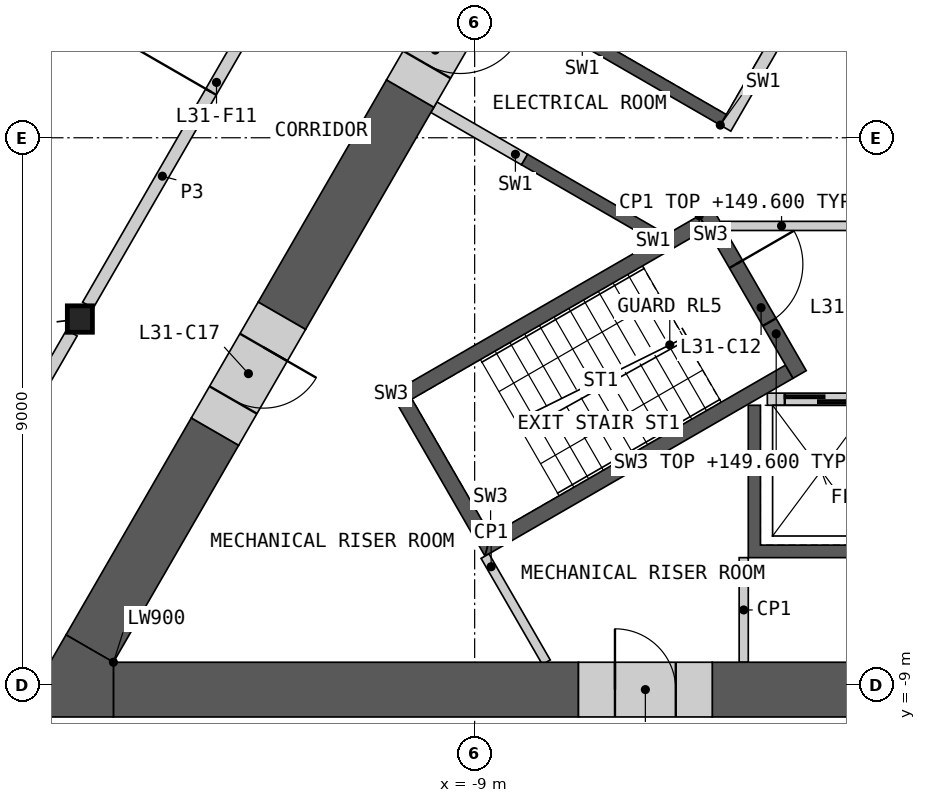
"""IFC4 building model, lengths in metres.
Left out: names, types, materials, properties, quantities, classifications, styles, units other than length and angle.
Written with IfcOpenShell. Run it as: python <this file> out.ifc"""

import sys

from ifc_helpers import new_model, si_unit, direction, frame, frame_2d, origin, origin_2d, place, context, subcontext, project, spatial, polyline, rectangle, i_section, outline, extrude, element, fill, save


model = new_model("IFC4")
c1 = context("Model", 3, precision=1e-05, world=origin(), true_north=direction((0.0, 1.0)))
c2 = subcontext(c1, "Body", "Model", "MODEL_VIEW")
j1 = project(units=[si_unit("LENGTHUNIT", "METRE"), si_unit("PLANEANGLEUNIT", "RADIAN")], contexts=[c1])
p1 = place(None, origin())
s1 = spatial("IfcSite", under=j1, at=p1, CompositionType="ELEMENT")
p2 = place(p1, origin())
s2 = spatial("IfcBuilding", under=s1, at=p2, CompositionType="ELEMENT")
p3 = place(p2, frame((0.0, 0.0, 145.8)))
s3 = spatial("IfcBuildingStorey", under=s2, at=p3, CompositionType="ELEMENT", Elevation=145.8)
p4 = place(p3, frame((-15.493, -2.982, 0.0), z_axis=(0.0, 0.0, 1.0), x_axis=(1.0, 0.0, 0.0)))
e1 = element("IfcColumn", 1, at=p4, inside=s3, PredefinedType="COLUMN", context=c2, shape_type="SweptSolid", body=[
    extrude(i_section(OverallWidth=0.412, OverallDepth=0.435, WebThickness=0.036, FlangeThickness=0.057, at=origin_2d()), origin(), (0.0, 0.0, 1.0), 4.2),
])
p5 = place(p3, origin())
e2 = element("IfcWall", 2, at=p5, inside=s3, PredefinedType="SHEAR", context=c2, shape_type="SweptSolid", body=[
    extrude(outline(polyline([(4.5, -4.4), (4.5, -6.906), (-4.5, -6.906), (-4.5, -4.4), (-4.3, -4.4), (-4.3, -6.7), (-2.3, -6.7), (-2.3, -4.4), (-2.1, -4.4), (-2.1, -6.7), (-0.1, -6.7), (-0.1, -4.4), (0.1, -4.4), (0.1, -6.7), (2.1, -6.7), (2.1, -4.4), (2.3, -4.4), (2.3, -6.7), (4.3, -6.7), (4.3, -4.4), (4.5, -4.4)])), origin(), (0.0, 0.0, 1.0), 3.8),
])
p6 = place(p3, frame((-4.187, -4.3, 0.0), z_axis=(0.0, 0.0, 1.0), x_axis=(1.0, 0.0, 0.0)))
e3 = element("IfcWall", 3, at=p6, inside=s3, PredefinedType="SOLIDWALL", context=c2, shape_type="SweptSolid", body=[
    extrude(rectangle(XDim=8.373, YDim=0.2, at=frame_2d((4.187, 0.0))), origin(), (0.0, 0.0, 1.0), 3.8),
])
p7 = place(p6, frame((0.287, 0.0, 0.0)))
e4 = element("IfcOpeningElement", 4, at=p7, cuts=e3, PredefinedType="OPENING", context=c2, shape_type="SweptSolid", body=[
    extrude(rectangle(XDim=1.2, YDim=2.1, at=frame_2d((0.6, 1.05))), frame((0.0, 0.11, 0.0), z_axis=(0.0, -1.0, 0.0), x_axis=(1.0, 0.0, 0.0)), (0.0, 0.0, 1.0), 0.22),
])
p8 = place(p6, frame((2.387, 0.0, 0.0)))
e5 = element("IfcOpeningElement", 5, at=p8, cuts=e3, PredefinedType="OPENING", context=c2, shape_type="SweptSolid", body=[
    extrude(rectangle(XDim=1.4, YDim=2.1, at=frame_2d((0.7, 1.05))), frame((0.0, 0.11, 0.0), z_axis=(0.0, -1.0, 0.0), x_axis=(1.0, 0.0, 0.0)), (0.0, 0.0, 1.0), 0.22),
])
p9 = place(p6, frame((4.737, 0.0, 0.0)))
e6 = element("IfcOpeningElement", 6, at=p9, cuts=e3, PredefinedType="OPENING", context=c2, shape_type="SweptSolid", body=[
    extrude(rectangle(XDim=1.1, YDim=2.1, at=frame_2d((0.55, 1.05))), frame((0.0, 0.11, 0.0), z_axis=(0.0, -1.0, 0.0), x_axis=(1.0, 0.0, 0.0)), (0.0, 0.0, 1.0), 0.22),
])
p10 = place(p6, frame((6.887, 0.0, 0.0)))
e7 = element("IfcOpeningElement", 7, at=p10, cuts=e3, PredefinedType="OPENING", context=c2, shape_type="SweptSolid", body=[
    extrude(rectangle(XDim=1.2, YDim=2.1, at=frame_2d((0.6, 1.05))), frame((0.0, 0.11, 0.0), z_axis=(0.0, -1.0, 0.0), x_axis=(1.0, 0.0, 0.0)), (0.0, 0.0, 1.0), 0.22),
])
p11 = place(p3, origin())
e8 = element("IfcWall", 8, at=p11, inside=s3, PredefinedType="SHEAR", context=c2, shape_type="SweptSolid", body=[
    extrude(outline(polyline([(-6.061, -1.697), (-8.231, -0.444), (-8.131, -0.271), (-5.96, -1.524), (-6.061, -1.697)])), origin(), (0.0, 0.0, 1.0), 3.8),
])
p12 = place(p3, origin())
e9 = element("IfcWall", 9, at=p12, inside=s3, PredefinedType="SHEAR", context=c2, shape_type="SweptSolid", body=[
    extrude(outline(polyline([(-4.96, 0.208), (-7.131, 1.461), (-5.931, 3.54), (-3.76, 2.287), (-3.861, 2.113), (-5.852, 3.263), (-6.852, 1.531), (-4.861, 0.381), (-4.96, 0.208)])), origin(), (0.0, 0.0, 1.0), 3.8),
])
p13 = place(p3, frame((-1.631, 5.776, 0.0), z_axis=(0.0, 0.0, 1.0), x_axis=(-0.499992876559, -0.866029516466, 0.0)))
e10 = element("IfcWall", 10, at=p13, inside=s3, PredefinedType="SOLIDWALL", context=c2, shape_type="SweptSolid", body=[
    extrude(rectangle(XDim=6.486, YDim=0.2, at=frame_2d((3.243, 0.0))), origin(), (0.0, 0.0, 1.0), 3.8),
])
p14 = place(p13, frame((0.437, 0.0, 0.0)))
e11 = element("IfcOpeningElement", 11, at=p14, cuts=e10, PredefinedType="OPENING", context=c2, shape_type="SweptSolid", body=[
    extrude(rectangle(XDim=0.9, YDim=2.1, at=frame_2d((0.45, 1.05))), frame((0.0, 0.11, 0.0), z_axis=(0.0, -1.0, 0.0), x_axis=(1.0, 0.0, 0.0)), (0.0, 0.0, 1.0), 0.22),
])
p15 = place(p13, frame((2.637, 0.0, 0.0)))
e12 = element("IfcOpeningElement", 12, at=p15, cuts=e10, PredefinedType="OPENING", context=c2, shape_type="SweptSolid", body=[
    extrude(rectangle(XDim=0.9, YDim=2.1, at=frame_2d((0.45, 1.05))), frame((0.0, 0.11, 0.0), z_axis=(0.0, -1.0, 0.0), x_axis=(1.0, 0.0, 0.0)), (0.0, 0.0, 1.0), 0.22),
])
p16 = place(p3, frame((-8.181, -0.357, 0.0), z_axis=(0.0, 0.0, 1.0), x_axis=(-0.866024871741, 0.500000921525, 0.0)))
e13 = element("IfcWall", 13, at=p16, inside=s3, PredefinedType="SHEAR", context=c2, shape_type="SweptSolid", body=[
    extrude(rectangle(XDim=1.72, YDim=0.2, at=frame_2d((0.86, 0.0))), origin(), (0.0, 0.0, 1.0), 3.8),
])
p17 = place(p3, frame((-4.941, -1.45, 0.0), z_axis=(0.0, 0.0, 1.0), x_axis=(1.0, 0.0, 0.0)))
e14 = element("IfcWall", 14, at=p17, inside=s3, PredefinedType="PARTITIONING", context=c2, shape_type="SweptSolid", body=[
    extrude(rectangle(XDim=9.882, YDim=0.15, at=frame_2d((4.941, 0.0))), origin(), (0.0, 0.0, 1.0), 3.8),
])
p18 = place(p17, frame((4.391, 0.0, 0.0)))
e15 = element("IfcOpeningElement", 15, at=p18, cuts=e14, PredefinedType="OPENING", context=c2, shape_type="SweptSolid", body=[
    extrude(rectangle(XDim=1.1, YDim=2.1, at=frame_2d((0.55, 1.05))), frame((0.0, 0.085, 0.0), z_axis=(0.0, -1.0, 0.0), x_axis=(1.0, 0.0, 0.0)), (0.0, 0.0, 1.0), 0.17),
])
p19 = place(p3, origin())
e16 = element("IfcWall", 16, at=p19, inside=s3, PredefinedType="SHEAR", context=c2, shape_type="SweptSolid", body=[
    extrude(outline(polyline([(-5.307, -1.281), (-10.374, -4.206), (-10.032, -4.298), (-5.182, -1.498), (-5.307, -1.281)])), origin(), (0.0, 0.0, 1.0), 3.8),
])
p20 = place(p3, origin())
e17 = element("IfcWall", 17, at=p20, inside=s3, PredefinedType="SHEAR", context=c2, shape_type="SweptSolid", body=[
    extrude(outline(polyline([(-10.374, -4.206), (-8.83, -6.881), (-8.738, -6.539), (-10.032, -4.298), (-10.374, -4.206)])), origin(), (0.0, 0.0, 1.0), 3.8),
])
p21 = place(p3, origin())
e18 = element("IfcWall", 18, at=p21, inside=s3, PredefinedType="SHEAR", context=c2, shape_type="SweptSolid", body=[
    extrude(outline(polyline([(-8.738, -6.539), (-8.83, -6.881), (-3.763, -3.956), (-3.888, -3.739), (-8.738, -6.539)])), origin(), (0.0, 0.0, 1.0), 3.8),
])
p22 = place(p3, frame((-5.199, -1.219, 0.0), z_axis=(0.0, 0.0, 1.0), x_axis=(0.499982516597, -0.866035497597, 0.0)))
e19 = element("IfcWall", 19, at=p22, inside=s3, PredefinedType="SHEAR", context=c2, shape_type="SweptSolid", body=[
    extrude(rectangle(XDim=3.088, YDim=0.25, at=frame_2d((1.544, 0.0))), origin(), (0.0, 0.0, 1.0), 3.8),
])
p23 = place(p22, frame((0.994, 0.0, 0.0)))
e20 = element("IfcOpeningElement", 20, at=p23, cuts=e19, PredefinedType="OPENING", context=c2, shape_type="SweptSolid", body=[
    extrude(rectangle(XDim=1.1, YDim=2.1, at=frame_2d((0.55, 1.05))), frame((0.0, 0.135, 0.0), z_axis=(0.0, -1.0, 0.0), x_axis=(1.0, 0.0, 0.0)), (0.0, 0.0, 1.0), 0.27),
])
p24 = place(p3, frame((-4.575, -6.906, 0.0), z_axis=(0.0, 0.0, 1.0), x_axis=(0.0, -1.0, 0.0)))
e21 = element("IfcWall", 21, at=p24, inside=s3, PredefinedType="PARTITIONING", context=c2, shape_type="SweptSolid", body=[
    extrude(rectangle(XDim=1.72, YDim=0.15, at=frame_2d((0.86, 0.0))), origin(), (0.0, 0.0, 1.0), 3.8),
])
p25 = place(p3, frame((-8.83, -6.881, 0.0), z_axis=(0.0, 0.0, 1.0), x_axis=(0.500085890408, -0.865975809255, 0.0)))
e22 = element("IfcWall", 22, at=p25, inside=s3, PredefinedType="PARTITIONING", context=c2, shape_type="SweptSolid", body=[
    extrude(rectangle(XDim=2.016, YDim=0.15, at=frame_2d((1.008, 0.0))), origin(), (0.0, 0.0, 1.0), 3.8),
])
p26 = place(p3, frame((-14.941, -9.076, 0.0), z_axis=(0.0, 0.0, 1.0), x_axis=(1.0, 0.0, 0.0)))
e23 = element("IfcWall", 23, at=p26, inside=s3, PredefinedType="SHEAR", context=c2, shape_type="SweptSolid", body=[
    extrude(rectangle(XDim=7.649, YDim=0.9, at=frame_2d((3.824, 0.0))), origin(), (0.0, 0.0, 1.0), 3.8),
])
p27 = place(p3, frame((-5.093, -9.076, 0.0), z_axis=(0.0, 0.0, 1.0), x_axis=(1.0, 0.0, 0.0)))
e24 = element("IfcWall", 24, at=p27, inside=s3, PredefinedType="SHEAR", context=c2, shape_type="SweptSolid", body=[
    extrude(rectangle(XDim=3.992, YDim=0.9, at=frame_2d((1.996, 0.0))), origin(), (0.0, 0.0, 1.0), 3.8),
])
p28 = place(p3, frame((-10.06, 0.728, 0.0), z_axis=(0.0, 0.0, 1.0), x_axis=(-0.500021220092, -0.866013152012, 0.0)))
e25 = element("IfcWall", 25, at=p28, inside=s3, PredefinedType="SHEAR", context=c2, shape_type="SweptSolid", body=[
    extrude(rectangle(XDim=4.22, YDim=0.9, at=frame_2d((2.11, 0.0))), origin(), (0.0, 0.0, 1.0), 3.8),
])
p29 = place(p3, frame((-13.271, -4.833, 0.0), z_axis=(0.0, 0.0, 1.0), x_axis=(-0.499994272862, -0.866028710324, 0.0)))
e26 = element("IfcWall", 26, at=p29, inside=s3, PredefinedType="SHEAR", context=c2, shape_type="SweptSolid", body=[
    extrude(rectangle(XDim=4.121, YDim=0.9, at=frame_2d((2.06, 0.0))), origin(), (0.0, 0.0, 1.0), 3.8),
])
p30 = place(p3, origin())
e27 = element("IfcWall", 27, at=p30, inside=s3, PredefinedType="SHEAR", context=c2, shape_type="SweptSolid", body=[
    extrude(outline(polyline([(-14.941, -8.626), (-14.941, -9.526), (-16.5, -9.526), (-15.721, -8.176), (-14.941, -8.626)])), origin(), (0.0, 0.0, 1.0), 3.8),
])
p31 = place(p3, frame((-12.171, -2.927, 0.0), z_axis=(0.0, 0.0, 1.0), x_axis=(-0.499946605688, -0.86605622881, 0.0)))
e28 = element("IfcWall", 28, at=p31, inside=s3, PredefinedType="SHEAR", context=c2, shape_type="SweptSolid", body=[
    extrude(rectangle(XDim=2.2, YDim=0.9, at=frame_2d((1.1, 0.0))), origin(), (0.0, 0.0, 1.0), 3.8),
])
p32 = place(p31, frame((0.6, 0.0, 0.0)))
e29 = element("IfcOpeningElement", 29, at=p32, cuts=e28, PredefinedType="OPENING", context=c2, shape_type="SweptSolid", body=[
    extrude(rectangle(XDim=1.0, YDim=2.1, at=frame_2d((0.5, 1.05))), frame((0.0, 0.46, 0.0), z_axis=(0.0, -1.0, 0.0), x_axis=(1.0, 0.0, 0.0)), (0.0, 0.0, 1.0), 0.92),
])
p33 = place(p3, frame((-7.292, -9.076, 0.0), z_axis=(0.0, 0.0, 1.0), x_axis=(1.0, 0.0, 0.0)))
e30 = element("IfcWall", 30, at=p33, inside=s3, PredefinedType="SHEAR", context=c2, shape_type="SweptSolid", body=[
    extrude(rectangle(XDim=2.2, YDim=0.9, at=frame_2d((1.1, 0.0))), origin(), (0.0, 0.0, 1.0), 3.8),
])
p34 = place(p33, frame((0.6, 0.0, 0.0)))
e31 = element("IfcOpeningElement", 31, at=p34, cuts=e30, PredefinedType="OPENING", context=c2, shape_type="SweptSolid", body=[
    extrude(rectangle(XDim=1.0, YDim=2.1, at=frame_2d((0.5, 1.05))), frame((0.0, 0.46, 0.0), z_axis=(0.0, -1.0, 0.0), x_axis=(1.0, 0.0, 0.0)), (0.0, 0.0, 1.0), 0.92),
])
p35 = place(p3, frame((-8.96, 2.633, 0.0), z_axis=(0.0, 0.0, 1.0), x_axis=(-0.50002983664, -0.866008176907, 0.0)))
e32 = element("IfcWall", 32, at=p35, inside=s3, PredefinedType="SHEAR", context=c2, shape_type="SweptSolid", body=[
    extrude(rectangle(XDim=2.2, YDim=0.9, at=frame_2d((1.1, 0.0))), origin(), (0.0, 0.0, 1.0), 3.8),
])
p36 = place(p35, frame((0.55, 0.0, 0.0)))
e33 = element("IfcOpeningElement", 33, at=p36, cuts=e32, PredefinedType="OPENING", context=c2, shape_type="SweptSolid", body=[
    extrude(rectangle(XDim=1.1, YDim=2.1, at=frame_2d((0.55, 1.05))), frame((0.0, 0.46, 0.0), z_axis=(0.0, -1.0, 0.0), x_axis=(1.0, 0.0, 0.0)), (0.0, 0.0, 1.0), 0.92),
])
p37 = place(p3, frame((-15.361, -2.754, 0.0), z_axis=(0.0, 0.0, 1.0), x_axis=(0.500004141693, 0.866023012564, 0.0)))
e34 = element("IfcWall", 34, at=p37, inside=s3, PredefinedType="PARTITIONING", context=c2, shape_type="SweptSolid", body=[
    extrude(rectangle(XDim=9.803, YDim=0.2, at=frame_2d((4.902, 0.0))), origin(), (0.0, 0.0, 1.0), 3.8),
])
p38 = place(p37, frame((4.052, 0.0, 0.0)))
e35 = element("IfcOpeningElement", 35, at=p38, cuts=e34, PredefinedType="OPENING", context=c2, shape_type="SweptSolid", body=[
    extrude(rectangle(XDim=1.8, YDim=2.1, at=frame_2d((0.9, 1.05))), frame((0.0, 0.11, 0.0), z_axis=(0.0, -1.0, 0.0), x_axis=(1.0, 0.0, 0.0)), (0.0, 0.0, 1.0), 0.22),
])
p39 = place(p3, frame((-18.744, -8.613, 0.0), z_axis=(0.0, 0.0, 1.0), x_axis=(0.499997920671, 0.866026604282, 0.0)))
e36 = element("IfcWall", 36, at=p39, inside=s3, PredefinedType="PARTITIONING", context=c2, shape_type="SweptSolid", body=[
    extrude(rectangle(XDim=6.24, YDim=0.2, at=frame_2d((3.12, 0.0))), origin(), (0.0, 0.0, 1.0), 3.8),
])
p40 = place(p7, origin())
e37 = element("IfcDoor", 37, at=p40, inside=s3, OperationType="SLIDING_TO_LEFT", PredefinedType="DOOR", context=c2, shape_type="SweptSolid", body=[
    extrude(rectangle(XDim=1.2, YDim=2.1, at=frame_2d((0.6, 1.05))), frame((0.0, 0.025, 0.0), z_axis=(0.0, -1.0, 0.0), x_axis=(1.0, 0.0, 0.0)), (0.0, 0.0, 1.0), 0.05),
])
fill(e4, e37)
p41 = place(p23, origin())
e38 = element("IfcDoor", 38, at=p41, inside=s3, OperationType="SINGLE_SWING_LEFT", PredefinedType="DOOR", context=c2, shape_type="SweptSolid", body=[
    extrude(rectangle(XDim=1.1, YDim=2.1, at=frame_2d((0.55, 1.05))), frame((0.0, 0.025, 0.0), z_axis=(0.0, -1.0, 0.0), x_axis=(1.0, 0.0, 0.0)), (0.0, 0.0, 1.0), 0.05),
])
fill(e20, e38)
p42 = place(p32, origin())
e39 = element("IfcDoor", 39, at=p42, inside=s3, OperationType="SINGLE_SWING_LEFT", PredefinedType="DOOR", context=c2, shape_type="SweptSolid", body=[
    extrude(rectangle(XDim=1.0, YDim=2.1, at=frame_2d((0.5, 1.05))), frame((0.0, 0.205, 0.0), z_axis=(0.0, -1.0, 0.0), x_axis=(1.0, 0.0, 0.0)), (0.0, 0.0, 1.0), 0.05),
])
fill(e29, e39)
p43 = place(p34, origin())
e40 = element("IfcDoor", 40, at=p43, inside=s3, OperationType="SINGLE_SWING_LEFT", PredefinedType="DOOR", context=c2, shape_type="SweptSolid", body=[
    extrude(rectangle(XDim=1.0, YDim=2.1, at=frame_2d((0.5, 1.05))), frame((0.0, 0.205, 0.0), z_axis=(0.0, -1.0, 0.0), x_axis=(1.0, 0.0, 0.0)), (0.0, 0.0, 1.0), 0.05),
])
fill(e31, e40)
p44 = place(p36, origin())
e41 = element("IfcDoor", 41, at=p44, inside=s3, OperationType="SINGLE_SWING_LEFT", PredefinedType="DOOR", context=c2, shape_type="SweptSolid", body=[
    extrude(rectangle(XDim=1.1, YDim=2.1, at=frame_2d((0.55, 1.05))), frame((0.0, 0.205, 0.0), z_axis=(0.0, -1.0, 0.0), x_axis=(1.0, 0.0, 0.0)), (0.0, 0.0, 1.0), 0.05),
])
fill(e33, e41)
p45 = place(p38, origin())
e42 = element("IfcDoor", 42, at=p45, inside=s3, OperationType="DOUBLE_DOOR_SINGLE_SWING", PredefinedType="DOOR", context=c2, shape_type="SweptSolid", body=[
    extrude(rectangle(XDim=1.8, YDim=2.1, at=frame_2d((0.9, 1.05))), frame((0.0, 0.025, 0.0), z_axis=(0.0, -1.0, 0.0), x_axis=(1.0, 0.0, 0.0)), (0.0, 0.0, 1.0), 0.05),
])
fill(e35, e42)
save(model, sys.argv[1])
